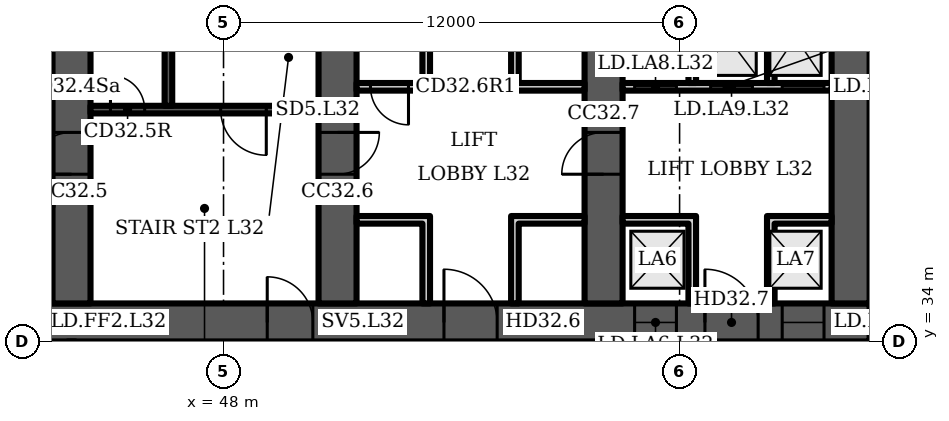
"""IFC4 building model, lengths in metres.
Left out: names, types, materials, properties, quantities, classifications, styles, units other than length and angle.
Written with IfcOpenShell. Run it as: python <this file> out.ifc"""

import sys

from ifc_helpers import new_model, si_unit, direction, frame, frame_2d, origin, place, context, subcontext, project, spatial, polyline, rectangle, outline, extrude, element, fill, save


model = new_model("IFC4")
c1 = context("Model", 3, precision=1e-05, world=origin(), true_north=direction((0.0, 1.0)))
c2 = subcontext(c1, "Body", "Model", "MODEL_VIEW")
j1 = project(units=[si_unit("LENGTHUNIT", "METRE"), si_unit("PLANEANGLEUNIT", "RADIAN")], contexts=[c1])
p1 = place(None, origin())
s1 = spatial("IfcSite", under=j1, at=p1, CompositionType="ELEMENT")
p2 = place(p1, origin())
s2 = spatial("IfcBuilding", under=s1, at=p2, CompositionType="ELEMENT")
p3 = place(p2, frame((0.0, 0.0, 136.3)))
s3 = spatial("IfcBuildingStorey", under=s2, at=p3, CompositionType="ELEMENT", Elevation=136.3)
p4 = place(p3, frame((16.0, 34.5, 0.0), z_axis=(0.0, 0.0, 1.0), x_axis=(1.0, 0.0, 0.0)))
e1 = element("IfcWall", 1, at=p4, inside=s3, PredefinedType="SHEAR", context=c2, shape_type="SweptSolid", body=[
    extrude(rectangle(XDim=49.0, YDim=1.0, at=frame_2d((24.5, 0.0))), origin(), (0.0, 0.0, 1.0), 3.6),
])
p5 = place(p4, frame((1.2, 0.0, 0.0)))
e2 = element("IfcOpeningElement", 2, at=p5, cuts=e1, PredefinedType="OPENING", context=c2, shape_type="SweptSolid", body=[
    extrude(rectangle(XDim=1.1, YDim=2.1, at=frame_2d((0.55, 1.05))), frame((0.0, 0.51, 0.0), z_axis=(0.0, -1.0, 0.0), x_axis=(1.0, 0.0, 0.0)), (0.0, 0.0, 1.0), 1.02),
])
p6 = place(p4, frame((5.083, 0.0, 0.0)))
e3 = element("IfcOpeningElement", 3, at=p6, cuts=e1, PredefinedType="OPENING", context=c2, shape_type="SweptSolid", body=[
    extrude(rectangle(XDim=1.1, YDim=2.1, at=frame_2d((0.55, 1.05))), frame((0.0, 0.51, 0.0), z_axis=(0.0, -1.0, 0.0), x_axis=(1.0, 0.0, 0.0)), (0.0, 0.0, 1.0), 1.02),
])
p7 = place(p4, frame((2.933, 0.0, 0.0)))
e4 = element("IfcOpeningElement", 4, at=p7, cuts=e1, PredefinedType="OPENING", context=c2, shape_type="SweptSolid", body=[
    extrude(rectangle(XDim=1.4, YDim=2.1, at=frame_2d((0.7, 1.05))), frame((0.0, 0.51, 0.0), z_axis=(0.0, -1.0, 0.0), x_axis=(1.0, 0.0, 0.0)), (0.0, 0.0, 1.0), 1.02),
])
p8 = place(p4, frame((7.65, 0.0, 0.0)))
e5 = element("IfcOpeningElement", 5, at=p8, cuts=e1, PredefinedType="OPENING", context=c2, shape_type="SweptSolid", body=[
    extrude(rectangle(XDim=1.2, YDim=2.1, at=frame_2d((0.6, 1.05))), frame((0.0, 0.51, 0.0), z_axis=(0.0, -1.0, 0.0), x_axis=(1.0, 0.0, 0.0)), (0.0, 0.0, 1.0), 1.02),
])
p9 = place(p4, frame((14.817, 0.0, 0.0)))
e6 = element("IfcOpeningElement", 6, at=p9, cuts=e1, PredefinedType="OPENING", context=c2, shape_type="SweptSolid", body=[
    extrude(rectangle(XDim=1.1, YDim=2.1, at=frame_2d((0.55, 1.05))), frame((0.0, 0.51, 0.0), z_axis=(0.0, -1.0, 0.0), x_axis=(1.0, 0.0, 0.0)), (0.0, 0.0, 1.0), 1.02),
])
p10 = place(p4, frame((19.083, 0.0, 0.0)))
e7 = element("IfcOpeningElement", 7, at=p10, cuts=e1, PredefinedType="OPENING", context=c2, shape_type="SweptSolid", body=[
    extrude(rectangle(XDim=1.1, YDim=2.1, at=frame_2d((0.55, 1.05))), frame((0.0, 0.51, 0.0), z_axis=(0.0, -1.0, 0.0), x_axis=(1.0, 0.0, 0.0)), (0.0, 0.0, 1.0), 1.02),
])
p11 = place(p4, frame((16.8, 0.0, 0.0)))
e8 = element("IfcOpeningElement", 8, at=p11, cuts=e1, PredefinedType="OPENING", context=c2, shape_type="SweptSolid", body=[
    extrude(rectangle(XDim=1.4, YDim=2.1, at=frame_2d((0.7, 1.05))), frame((0.0, 0.51, 0.0), z_axis=(0.0, -1.0, 0.0), x_axis=(1.0, 0.0, 0.0)), (0.0, 0.0, 1.0), 1.02),
])
p12 = place(p4, frame((21.817, 0.0, 0.0)))
e9 = element("IfcOpeningElement", 9, at=p12, cuts=e1, PredefinedType="OPENING", context=c2, shape_type="SweptSolid", body=[
    extrude(rectangle(XDim=1.1, YDim=2.1, at=frame_2d((0.55, 1.05))), frame((0.0, 0.51, 0.0), z_axis=(0.0, -1.0, 0.0), x_axis=(1.0, 0.0, 0.0)), (0.0, 0.0, 1.0), 1.02),
])
p13 = place(p4, frame((26.083, 0.0, 0.0)))
e10 = element("IfcOpeningElement", 10, at=p13, cuts=e1, PredefinedType="OPENING", context=c2, shape_type="SweptSolid", body=[
    extrude(rectangle(XDim=1.1, YDim=2.1, at=frame_2d((0.55, 1.05))), frame((0.0, 0.51, 0.0), z_axis=(0.0, -1.0, 0.0), x_axis=(1.0, 0.0, 0.0)), (0.0, 0.0, 1.0), 1.02),
])
p14 = place(p4, frame((33.15, 0.0, 0.0)))
e11 = element("IfcOpeningElement", 11, at=p14, cuts=e1, PredefinedType="OPENING", context=c2, shape_type="SweptSolid", body=[
    extrude(rectangle(XDim=1.2, YDim=2.1, at=frame_2d((0.6, 1.05))), frame((0.0, 0.51, 0.0), z_axis=(0.0, -1.0, 0.0), x_axis=(1.0, 0.0, 0.0)), (0.0, 0.0, 1.0), 1.02),
])
p15 = place(p4, frame((37.8, 0.0, 0.0)))
e12 = element("IfcOpeningElement", 12, at=p15, cuts=e1, PredefinedType="OPENING", context=c2, shape_type="SweptSolid", body=[
    extrude(rectangle(XDim=1.4, YDim=2.1, at=frame_2d((0.7, 1.05))), frame((0.0, 0.51, 0.0), z_axis=(0.0, -1.0, 0.0), x_axis=(1.0, 0.0, 0.0)), (0.0, 0.0, 1.0), 1.02),
])
p16 = place(p4, frame((42.817, 0.0, 0.0)))
e13 = element("IfcOpeningElement", 13, at=p16, cuts=e1, PredefinedType="OPENING", context=c2, shape_type="SweptSolid", body=[
    extrude(rectangle(XDim=1.1, YDim=2.1, at=frame_2d((0.55, 1.05))), frame((0.0, 0.51, 0.0), z_axis=(0.0, -1.0, 0.0), x_axis=(1.0, 0.0, 0.0)), (0.0, 0.0, 1.0), 1.02),
])
p17 = place(p4, frame((46.7, 0.0, 0.0)))
e14 = element("IfcOpeningElement", 14, at=p17, cuts=e1, PredefinedType="OPENING", context=c2, shape_type="SweptSolid", body=[
    extrude(rectangle(XDim=1.1, YDim=2.1, at=frame_2d((0.55, 1.05))), frame((0.0, 0.51, 0.0), z_axis=(0.0, -1.0, 0.0), x_axis=(1.0, 0.0, 0.0)), (0.0, 0.0, 1.0), 1.02),
])
p18 = place(p4, frame((44.667, 0.0, 0.0)))
e15 = element("IfcOpeningElement", 15, at=p18, cuts=e1, PredefinedType="OPENING", context=c2, shape_type="SweptSolid", body=[
    extrude(rectangle(XDim=1.4, YDim=2.1, at=frame_2d((0.7, 1.05))), frame((0.0, 0.51, 0.0), z_axis=(0.0, -1.0, 0.0), x_axis=(1.0, 0.0, 0.0)), (0.0, 0.0, 1.0), 1.02),
])
p19 = place(p3, frame((44.0, 35.0, 0.0), z_axis=(0.0, 0.0, 1.0), x_axis=(0.0, 1.0, 0.0)))
e16 = element("IfcWall", 16, at=p19, inside=s3, PredefinedType="SHEAR", context=c2, shape_type="SweptSolid", body=[
    extrude(rectangle(XDim=14.577, YDim=1.0, at=frame_2d((7.289, 0.0))), origin(), (0.0, 0.0, 1.0), 3.6),
])
p20 = place(p19, frame((3.4, 0.0, 0.0)))
e17 = element("IfcOpeningElement", 17, at=p20, cuts=e16, PredefinedType="OPENING", context=c2, shape_type="SweptSolid", body=[
    extrude(rectangle(XDim=1.1, YDim=2.1, at=frame_2d((0.55, 1.05))), frame((0.0, 0.51, 0.0), z_axis=(0.0, -1.0, 0.0), x_axis=(1.0, 0.0, 0.0)), (0.0, 0.0, 1.0), 1.02),
])
p21 = place(p19, frame((9.8, 0.0, 0.0)))
e18 = element("IfcOpeningElement", 18, at=p21, cuts=e16, PredefinedType="OPENING", context=c2, shape_type="SweptSolid", body=[
    extrude(rectangle(XDim=1.0, YDim=2.1, at=frame_2d((0.5, 1.05))), frame((0.0, 0.51, 0.0), z_axis=(0.0, -1.0, 0.0), x_axis=(1.0, 0.0, 0.0)), (0.0, 0.0, 1.0), 1.02),
])
p22 = place(p3, frame((51.0, 35.0, 0.0), z_axis=(0.0, 0.0, 1.0), x_axis=(0.0, 1.0, 0.0)))
e19 = element("IfcWall", 19, at=p22, inside=s3, PredefinedType="SHEAR", context=c2, shape_type="SweptSolid", body=[
    extrude(rectangle(XDim=13.965, YDim=1.0, at=frame_2d((6.982, 0.0))), origin(), (0.0, 0.0, 1.0), 3.6),
])
p23 = place(p22, frame((3.4, 0.0, 0.0)))
e20 = element("IfcOpeningElement", 20, at=p23, cuts=e19, PredefinedType="OPENING", context=c2, shape_type="SweptSolid", body=[
    extrude(rectangle(XDim=1.1, YDim=2.1, at=frame_2d((0.55, 1.05))), frame((0.0, 0.51, 0.0), z_axis=(0.0, -1.0, 0.0), x_axis=(1.0, 0.0, 0.0)), (0.0, 0.0, 1.0), 1.02),
])
p24 = place(p3, frame((58.0, 35.0, 0.0), z_axis=(0.0, 0.0, 1.0), x_axis=(0.0, 1.0, 0.0)))
e21 = element("IfcWall", 21, at=p24, inside=s3, PredefinedType="SHEAR", context=c2, shape_type="SweptSolid", body=[
    extrude(rectangle(XDim=13.352, YDim=1.0, at=frame_2d((6.676, 0.0))), origin(), (0.0, 0.0, 1.0), 3.6),
])
p25 = place(p24, frame((10.426, 0.0, 0.0)))
e22 = element("IfcOpeningElement", 22, at=p25, cuts=e21, PredefinedType="OPENING", context=c2, shape_type="SweptSolid", body=[
    extrude(rectangle(XDim=1.0, YDim=2.1, at=frame_2d((0.5, 1.05))), frame((0.0, 0.51, 0.0), z_axis=(0.0, -1.0, 0.0), x_axis=(1.0, 0.0, 0.0)), (0.0, 0.0, 1.0), 1.02),
])
p26 = place(p24, frame((3.4, 0.0, 0.0)))
e23 = element("IfcOpeningElement", 23, at=p26, cuts=e21, PredefinedType="OPENING", context=c2, shape_type="SweptSolid", body=[
    extrude(rectangle(XDim=1.1, YDim=2.1, at=frame_2d((0.55, 1.05))), frame((0.0, 0.51, 0.0), z_axis=(0.0, -1.0, 0.0), x_axis=(1.0, 0.0, 0.0)), (0.0, 0.0, 1.0), 1.02),
])
p27 = place(p3, frame((64.5, 35.0, 0.0), z_axis=(0.0, 0.0, 1.0), x_axis=(0.0, 1.0, 0.0)))
e24 = element("IfcWall", 24, at=p27, inside=s3, PredefinedType="SHEAR", context=c2, shape_type="SweptSolid", body=[
    extrude(rectangle(XDim=12.784, YDim=1.0, at=frame_2d((6.392, 0.0))), origin(), (0.0, 0.0, 1.0), 3.6),
])
p28 = place(p3, frame((44.5, 40.1, 0.0), z_axis=(0.0, 0.0, 1.0), x_axis=(1.0, 0.0, 0.0)))
e25 = element("IfcWall", 25, at=p28, inside=s3, PredefinedType="SHEAR", context=c2, shape_type="SweptSolid", body=[
    extrude(rectangle(XDim=6.0, YDim=0.2, at=frame_2d((3.0, 0.0))), origin(), (0.0, 0.0, 1.0), 3.2),
])
p29 = place(p28, frame((3.425, 0.0, 0.0)))
e26 = element("IfcOpeningElement", 26, at=p29, cuts=e25, PredefinedType="OPENING", context=c2, shape_type="SweptSolid", body=[
    extrude(rectangle(XDim=1.2, YDim=2.1, at=frame_2d((0.6, 1.05))), frame((0.0, 0.11, 0.0), z_axis=(0.0, -1.0, 0.0), x_axis=(1.0, 0.0, 0.0)), (0.0, 0.0, 1.0), 0.22),
])
p30 = place(p28, frame((0.525, 0.0, 0.0)))
e27 = element("IfcOpeningElement", 27, at=p30, cuts=e25, PredefinedType="OPENING", context=c2, shape_type="SweptSolid", body=[
    extrude(rectangle(XDim=0.9, YDim=2.1, at=frame_2d((0.45, 1.05))), frame((0.0, 0.11, 0.0), z_axis=(0.0, -1.0, 0.0), x_axis=(1.0, 0.0, 0.0)), (0.0, 0.0, 1.0), 0.22),
])
p31 = place(p3, frame((46.55, 40.2, 0.0), z_axis=(0.0, 0.0, 1.0), x_axis=(0.0, 1.0, 0.0)))
e28 = element("IfcWall", 28, at=p31, inside=s3, PredefinedType="SHEAR", context=c2, shape_type="SweptSolid", body=[
    extrude(rectangle(XDim=7.2, YDim=0.2, at=frame_2d((3.6, 0.0))), origin(), (0.0, 0.0, 1.0), 3.2),
])
p32 = place(p3, frame((51.5, 40.7, 0.0), z_axis=(0.0, 0.0, 1.0), x_axis=(1.0, 0.0, 0.0)))
e29 = element("IfcWall", 29, at=p32, inside=s3, PredefinedType="PARTITIONING", context=c2, shape_type="SweptSolid", body=[
    extrude(rectangle(XDim=6.0, YDim=0.2, at=frame_2d((3.0, 0.0))), origin(), (0.0, 0.0, 1.0), 3.2),
])
p33 = place(p32, frame((0.367, 0.0, 0.0)))
e30 = element("IfcOpeningElement", 30, at=p33, cuts=e29, PredefinedType="OPENING", context=c2, shape_type="SweptSolid", body=[
    extrude(rectangle(XDim=1.0, YDim=2.1, at=frame_2d((0.5, 1.05))), frame((0.0, 0.11, 0.0), z_axis=(0.0, -1.0, 0.0), x_axis=(1.0, 0.0, 0.0)), (0.0, 0.0, 1.0), 0.22),
])
p34 = place(p3, frame((0.0, 0.0, -0.0)))
e31 = element("IfcWall", 31, at=p34, inside=s3, PredefinedType="PARTITIONING", context=c2, shape_type="SweptSolid", body=[
    extrude(outline(polyline([(53.233, 37.1), (51.5, 37.1), (51.5, 37.3), (53.233, 37.3), (53.433, 37.3), (53.433, 35.0), (53.233, 35.0), (53.233, 37.1)])), origin(), (0.0, 0.0, 1.0), 3.2),
])
p35 = place(p3, frame((0.0, 0.0, -0.0)))
e32 = element("IfcWall", 32, at=p35, inside=s3, PredefinedType="PARTITIONING", context=c2, shape_type="SweptSolid", body=[
    extrude(outline(polyline([(55.567, 37.3), (55.767, 37.3), (57.5, 37.3), (57.5, 37.1), (55.767, 37.1), (55.767, 35.0), (55.567, 35.0), (55.567, 37.3)])), origin(), (0.0, 0.0, 1.0), 3.2),
])
p36 = place(p3, frame((0.0, 0.0, -0.0)))
e33 = element("IfcWall", 33, at=p36, inside=s3, PredefinedType="PARTITIONING", context=c2, shape_type="SweptSolid", body=[
    extrude(outline(polyline([(53.233, 40.8), (53.233, 43.8), (53.433, 43.8), (53.433, 40.8), (53.233, 40.8)])), origin(), (0.0, 0.0, 1.0), 3.2),
])
p37 = place(p3, frame((0.0, 0.0, -0.0)))
e34 = element("IfcWall", 34, at=p37, inside=s3, PredefinedType="PARTITIONING", context=c2, shape_type="SweptSolid", body=[
    extrude(outline(polyline([(55.567, 40.8), (55.567, 43.8), (55.767, 43.8), (55.767, 40.8), (55.567, 40.8)])), origin(), (0.0, 0.0, 1.0), 3.2),
])
p38 = place(p3, frame((58.5, 40.7, 0.0), z_axis=(0.0, 0.0, 1.0), x_axis=(1.0, 0.0, 0.0)))
e35 = element("IfcWall", 35, at=p38, inside=s3, PredefinedType="PARTITIONING", context=c2, shape_type="SweptSolid", body=[
    extrude(rectangle(XDim=5.5, YDim=0.2, at=frame_2d((2.75, 0.0))), origin(), (0.0, 0.0, 1.0), 3.2),
])
p39 = place(p38, frame((0.317, 0.0, 0.0)))
e36 = element("IfcOpeningElement", 36, at=p39, cuts=e35, PredefinedType="OPENING", context=c2, shape_type="SweptSolid", body=[
    extrude(rectangle(XDim=1.1, YDim=2.1, at=frame_2d((0.55, 1.05))), frame((0.0, 0.11, 0.0), z_axis=(0.0, -1.0, 0.0), x_axis=(1.0, 0.0, 0.0)), (0.0, 0.0, 1.0), 0.22),
])
p40 = place(p38, frame((2.317, 0.0, 0.0)))
e37 = element("IfcOpeningElement", 37, at=p40, cuts=e35, PredefinedType="OPENING", context=c2, shape_type="SweptSolid", body=[
    extrude(rectangle(XDim=1.1, YDim=2.1, at=frame_2d((0.55, 1.05))), frame((0.0, 0.11, 0.0), z_axis=(0.0, -1.0, 0.0), x_axis=(1.0, 0.0, 0.0)), (0.0, 0.0, 1.0), 0.22),
])
p41 = place(p38, frame((4.2, 0.0, 0.0)))
e38 = element("IfcOpeningElement", 38, at=p41, cuts=e35, PredefinedType="OPENING", context=c2, shape_type="SweptSolid", body=[
    extrude(rectangle(XDim=1.1, YDim=2.1, at=frame_2d((0.55, 1.05))), frame((0.0, 0.11, 0.0), z_axis=(0.0, -1.0, 0.0), x_axis=(1.0, 0.0, 0.0)), (0.0, 0.0, 1.0), 0.22),
])
p42 = place(p3, frame((0.0, 0.0, -0.0)))
e39 = element("IfcWall", 39, at=p42, inside=s3, PredefinedType="PARTITIONING", context=c2, shape_type="SweptSolid", body=[
    extrude(outline(polyline([(60.233, 37.1), (58.5, 37.1), (58.5, 37.3), (60.233, 37.3), (60.433, 37.3), (60.433, 35.0), (60.233, 35.0), (60.233, 37.1)])), origin(), (0.0, 0.0, 1.0), 3.2),
])
p43 = place(p3, frame((0.0, 0.0, -0.0)))
e40 = element("IfcWall", 40, at=p43, inside=s3, PredefinedType="PARTITIONING", context=c2, shape_type="SweptSolid", body=[
    extrude(outline(polyline([(62.3, 37.3), (62.5, 37.3), (64.0, 37.3), (64.0, 37.1), (62.5, 37.1), (62.5, 35.0), (62.3, 35.0), (62.3, 37.3)])), origin(), (0.0, 0.0, 1.0), 3.2),
])
p44 = place(p3, frame((0.0, 0.0, -0.0)))
e41 = element("IfcWall", 41, at=p44, inside=s3, PredefinedType="PARTITIONING", context=c2, shape_type="SweptSolid", body=[
    extrude(outline(polyline([(60.433, 40.8), (60.233, 40.8), (60.233, 43.8), (58.5, 43.8), (58.5, 44.0), (64.0, 44.0), (64.0, 43.8), (62.5, 43.8), (62.5, 40.8), (62.3, 40.8), (62.3, 43.8), (60.433, 43.8), (60.433, 40.8)])), origin(), (0.0, 0.0, 1.0), 3.2),
])
p45 = place(p29, origin())
e42 = element("IfcDoor", 42, at=p45, inside=s3, OperationType="SINGLE_SWING_RIGHT", PredefinedType="DOOR", context=c2, shape_type="SweptSolid", body=[
    extrude(rectangle(XDim=1.2, YDim=2.1, at=frame_2d((0.6, 1.05))), frame((0.0, 0.025, 0.0), z_axis=(0.0, -1.0, 0.0), x_axis=(1.0, 0.0, 0.0)), (0.0, 0.0, 1.0), 0.05),
])
fill(e26, e42)
p46 = place(p30, origin())
e43 = element("IfcDoor", 43, at=p46, inside=s3, OperationType="SINGLE_SWING_LEFT", PredefinedType="DOOR", context=c2, shape_type="SweptSolid", body=[
    extrude(rectangle(XDim=0.9, YDim=2.1, at=frame_2d((0.45, 1.05))), frame((0.0, 0.025, 0.0), z_axis=(0.0, -1.0, 0.0), x_axis=(1.0, 0.0, 0.0)), (0.0, 0.0, 1.0), 0.05),
])
fill(e27, e43)
p47 = place(p14, origin())
e44 = element("IfcDoor", 44, at=p47, inside=s3, OperationType="SINGLE_SWING_LEFT", PredefinedType="DOOR", context=c2, shape_type="SweptSolid", body=[
    extrude(rectangle(XDim=1.2, YDim=2.1, at=frame_2d((0.6, 1.05))), frame((0.0, 0.025, 0.0), z_axis=(0.0, -1.0, 0.0), x_axis=(1.0, 0.0, 0.0)), (0.0, 0.0, 1.0), 0.05),
])
fill(e11, e44)
p48 = place(p15, origin())
e45 = element("IfcDoor", 45, at=p48, inside=s3, OperationType="DOUBLE_DOOR_SINGLE_SWING", PredefinedType="DOOR", context=c2, shape_type="SweptSolid", body=[
    extrude(rectangle(XDim=1.4, YDim=2.1, at=frame_2d((0.7, 1.05))), frame((0.0, 0.025, 0.0), z_axis=(0.0, -1.0, 0.0), x_axis=(1.0, 0.0, 0.0)), (0.0, 0.0, 1.0), 0.05),
])
fill(e12, e45)
p49 = place(p33, origin())
e46 = element("IfcDoor", 46, at=p49, inside=s3, OperationType="SINGLE_SWING_RIGHT", PredefinedType="DOOR", context=c2, shape_type="SweptSolid", body=[
    extrude(rectangle(XDim=1.0, YDim=2.1, at=frame_2d((0.5, 1.05))), frame((0.0, 0.025, 0.0), z_axis=(0.0, -1.0, 0.0), x_axis=(1.0, 0.0, 0.0)), (0.0, 0.0, 1.0), 0.05),
])
fill(e30, e46)
p50 = place(p16, origin())
e47 = element("IfcDoor", 47, at=p50, inside=s3, OperationType="DOUBLE_DOOR_SLIDING", PredefinedType="DOOR", context=c2, shape_type="SweptSolid", body=[
    extrude(rectangle(XDim=1.1, YDim=2.1, at=frame_2d((0.55, 1.05))), frame((0.0, 0.025, 0.0), z_axis=(0.0, -1.0, 0.0), x_axis=(1.0, 0.0, 0.0)), (0.0, 0.0, 1.0), 0.05),
])
fill(e13, e47)
p51 = place(p17, origin())
e48 = element("IfcDoor", 48, at=p51, inside=s3, OperationType="DOUBLE_DOOR_SLIDING", PredefinedType="DOOR", context=c2, shape_type="SweptSolid", body=[
    extrude(rectangle(XDim=1.1, YDim=2.1, at=frame_2d((0.55, 1.05))), frame((0.0, 0.025, 0.0), z_axis=(0.0, -1.0, 0.0), x_axis=(1.0, 0.0, 0.0)), (0.0, 0.0, 1.0), 0.05),
])
fill(e14, e48)
p52 = place(p18, origin())
e49 = element("IfcDoor", 49, at=p52, inside=s3, OperationType="DOUBLE_DOOR_SINGLE_SWING", PredefinedType="DOOR", context=c2, shape_type="SweptSolid", body=[
    extrude(rectangle(XDim=1.4, YDim=2.1, at=frame_2d((0.7, 1.05))), frame((0.0, 0.025, 0.0), z_axis=(0.0, -1.0, 0.0), x_axis=(1.0, 0.0, 0.0)), (0.0, 0.0, 1.0), 0.05),
])
fill(e15, e49)
p53 = place(p39, origin())
e50 = element("IfcDoor", 50, at=p53, inside=s3, OperationType="DOUBLE_DOOR_SLIDING", PredefinedType="DOOR", context=c2, shape_type="SweptSolid", body=[
    extrude(rectangle(XDim=1.1, YDim=2.1, at=frame_2d((0.55, 1.05))), frame((0.0, 0.025, 0.0), z_axis=(0.0, -1.0, 0.0), x_axis=(1.0, 0.0, 0.0)), (0.0, 0.0, 1.0), 0.05),
])
fill(e36, e50)
p54 = place(p40, origin())
e51 = element("IfcDoor", 51, at=p54, inside=s3, OperationType="DOUBLE_DOOR_SLIDING", PredefinedType="DOOR", context=c2, shape_type="SweptSolid", body=[
    extrude(rectangle(XDim=1.1, YDim=2.1, at=frame_2d((0.55, 1.05))), frame((0.0, 0.025, 0.0), z_axis=(0.0, -1.0, 0.0), x_axis=(1.0, 0.0, 0.0)), (0.0, 0.0, 1.0), 0.05),
])
fill(e37, e51)
p55 = place(p41, origin())
e52 = element("IfcDoor", 52, at=p55, inside=s3, OperationType="DOUBLE_DOOR_SLIDING", PredefinedType="DOOR", context=c2, shape_type="SweptSolid", body=[
    extrude(rectangle(XDim=1.1, YDim=2.1, at=frame_2d((0.55, 1.05))), frame((0.0, 0.025, 0.0), z_axis=(0.0, -1.0, 0.0), x_axis=(1.0, 0.0, 0.0)), (0.0, 0.0, 1.0), 0.05),
])
fill(e38, e52)
p56 = place(p20, origin())
e53 = element("IfcDoor", 53, at=p56, inside=s3, OperationType="SINGLE_SWING_LEFT", PredefinedType="DOOR", context=c2, shape_type="SweptSolid", body=[
    extrude(rectangle(XDim=1.1, YDim=2.1, at=frame_2d((0.55, 1.05))), frame((0.0, 0.025, 0.0), z_axis=(0.0, -1.0, 0.0), x_axis=(1.0, 0.0, 0.0)), (0.0, 0.0, 1.0), 0.05),
])
fill(e17, e53)
p57 = place(p23, origin())
e54 = element("IfcDoor", 54, at=p57, inside=s3, OperationType="SINGLE_SWING_RIGHT", PredefinedType="DOOR", context=c2, shape_type="SweptSolid", body=[
    extrude(rectangle(XDim=1.1, YDim=2.1, at=frame_2d((0.55, 1.05))), frame((0.0, 0.025, 0.0), z_axis=(0.0, -1.0, 0.0), x_axis=(1.0, 0.0, 0.0)), (0.0, 0.0, 1.0), 0.05),
])
fill(e20, e54)
p58 = place(p26, origin())
e55 = element("IfcDoor", 55, at=p58, inside=s3, OperationType="SINGLE_SWING_LEFT", PredefinedType="DOOR", context=c2, shape_type="SweptSolid", body=[
    extrude(rectangle(XDim=1.1, YDim=2.1, at=frame_2d((0.55, 1.05))), frame((0.0, 0.025, 0.0), z_axis=(0.0, -1.0, 0.0), x_axis=(1.0, 0.0, 0.0)), (0.0, 0.0, 1.0), 0.05),
])
fill(e23, e55)
save(model, sys.argv[1])
